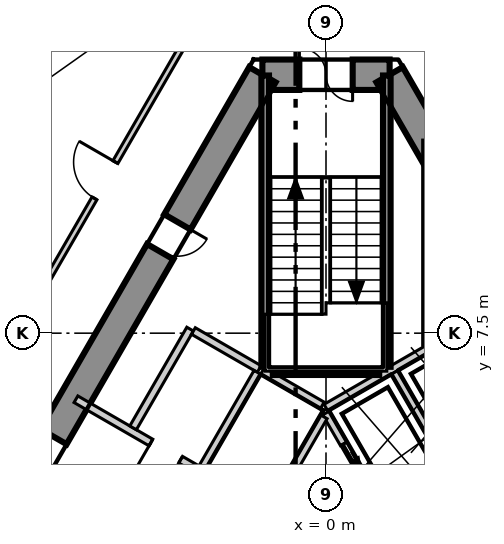
"""IFC4 building model, lengths in metres.
Left out: names, types, materials, properties, quantities, classifications, styles, units other than length and angle.
Written with IfcOpenShell. Run it as: python <this file> out.ifc"""

import sys

from ifc_helpers import new_model, si_unit, direction, frame, frame_2d, origin, place, context, subcontext, project, spatial, polyline, rectangle, outline, extrude, element, fill, save


model = new_model("IFC4")
c1 = context("Model", 3, precision=1e-05, world=origin(), true_north=direction((0.0, 1.0)))
c2 = subcontext(c1, "Body", "Model", "MODEL_VIEW")
j1 = project(units=[si_unit("LENGTHUNIT", "METRE"), si_unit("PLANEANGLEUNIT", "RADIAN")], contexts=[c1])
p1 = place(None, origin())
s1 = spatial("IfcSite", under=j1, at=p1, CompositionType="ELEMENT")
p2 = place(p1, origin())
s2 = spatial("IfcBuilding", under=s1, at=p2, CompositionType="ELEMENT")
p3 = place(p2, frame((0.0, 0.0, 152.3)))
s3 = spatial("IfcBuildingStorey", under=s2, at=p3, CompositionType="ELEMENT", Elevation=152.3)
p4 = place(p3, frame((1.674, 14.3, -0.3), z_axis=(0.0, 0.0, 1.0), x_axis=(-1.0, 0.0, 0.0)))
e1 = element("IfcWall", 1, at=p4, inside=s3, PredefinedType="SHEAR", context=c2, shape_type="SweptSolid", body=[
    extrude(outline(polyline([(-0.231, -0.4), (1.674, -0.4), (3.579, -0.4), (3.117, 0.4), (1.674, 0.4), (0.231, 0.4), (-0.231, -0.4)])), origin(), (0.0, 0.0, 1.0), 4.0),
])
p5 = place(p4, frame((0.974, 0.0, 0.3)))
e2 = element("IfcOpeningElement", 2, at=p5, cuts=e1, PredefinedType="OPENING", context=c2, shape_type="SweptSolid", body=[
    extrude(rectangle(XDim=1.4, YDim=2.1, at=frame_2d((0.7, 1.05))), frame((0.0, 0.41, 0.0), z_axis=(0.0, -1.0, 0.0), x_axis=(1.0, 0.0, 0.0)), (0.0, 0.0, 1.0), 0.82),
])
p6 = place(p3, frame((-1.674, 14.3, -0.3), z_axis=(0.0, 0.0, 1.0), x_axis=(-0.499995765644, -0.866027848477, 0.0)))
e3 = element("IfcWall", 3, at=p6, inside=s3, PredefinedType="SHEAR", context=c2, shape_type="SweptSolid", body=[
    extrude(outline(polyline([(-0.231, -0.4), (1.732, -0.4), (3.695, -0.4), (5.658, -0.4), (7.621, -0.4), (9.584, -0.4), (11.547, -0.4), (13.51, -0.4), (15.473, -0.4), (17.436, -0.4), (19.399, -0.4), (21.362, -0.4), (23.325, -0.4), (22.863, 0.4), (20.977, 0.4), (19.091, 0.4), (17.205, 0.4), (15.319, 0.4), (13.433, 0.4), (11.547, 0.4), (9.661, 0.4), (7.775, 0.4), (5.889, 0.4), (4.003, 0.4), (2.117, 0.4), (0.231, 0.4), (-0.231, -0.4)])), origin(), (0.0, 0.0, 1.0), 4.0),
])
p7 = place(p6, frame((10.997, 0.0, 0.3)))
e4 = element("IfcOpeningElement", 4, at=p7, cuts=e3, PredefinedType="OPENING", context=c2, shape_type="SweptSolid", body=[
    extrude(rectangle(XDim=1.1, YDim=2.1, at=frame_2d((0.55, 1.05))), frame((0.0, 0.41, 0.0), z_axis=(0.0, -1.0, 0.0), x_axis=(1.0, 0.0, 0.0)), (0.0, 0.0, 1.0), 0.82),
])
p8 = place(p6, frame((4.474, 0.0, 0.3)))
e5 = element("IfcOpeningElement", 5, at=p8, cuts=e3, PredefinedType="OPENING", context=c2, shape_type="SweptSolid", body=[
    extrude(rectangle(XDim=0.9, YDim=2.1, at=frame_2d((0.45, 1.05))), frame((0.0, 0.41, 0.0), z_axis=(0.0, -1.0, 0.0), x_axis=(1.0, 0.0, 0.0)), (0.0, 0.0, 1.0), 0.82),
])
p9 = place(p3, frame((13.221, -5.7, -0.3), z_axis=(0.0, 0.0, 1.0), x_axis=(-0.499995765644, 0.866027848477, 0.0)))
e6 = element("IfcWall", 6, at=p9, inside=s3, PredefinedType="SHEAR", context=c2, shape_type="SweptSolid", body=[
    extrude(outline(polyline([(-0.231, -0.4), (1.732, -0.4), (3.695, -0.4), (5.658, -0.4), (7.621, -0.4), (9.584, -0.4), (11.547, -0.4), (13.51, -0.4), (15.473, -0.4), (17.436, -0.4), (19.399, -0.4), (21.362, -0.4), (23.325, -0.4), (22.863, 0.4), (20.977, 0.4), (19.091, 0.4), (17.205, 0.4), (15.319, 0.4), (13.433, 0.4), (11.547, 0.4), (9.661, 0.4), (7.775, 0.4), (5.889, 0.4), (4.003, 0.4), (2.117, 0.4), (0.231, 0.4), (-0.231, -0.4)])), origin(), (0.0, 0.0, 1.0), 4.0),
])
p10 = place(p9, frame((10.647, 0.0, 0.3)))
e7 = element("IfcOpeningElement", 7, at=p10, cuts=e6, PredefinedType="OPENING", context=c2, shape_type="SweptSolid", body=[
    extrude(rectangle(XDim=1.8, YDim=2.1, at=frame_2d((0.9, 1.05))), frame((0.0, 0.41, 0.0), z_axis=(0.0, -1.0, 0.0), x_axis=(1.0, 0.0, 0.0)), (0.0, 0.0, 1.0), 0.82),
])
p11 = place(p3, frame((-3.018, 33.666, 0.0), z_axis=(0.0, 0.0, 1.0), x_axis=(-0.499984613623, -0.866034286931, 0.0)))
e8 = element("IfcWall", 8, at=p11, inside=s3, PredefinedType="ELEMENTEDWALL", context=c2, shape_type="SweptSolid", body=[
    extrude(rectangle(XDim=55.274, YDim=0.2, at=frame_2d((27.637, 0.0))), origin(), (0.0, 0.0, 1.0), 3.7),
])
p12 = place(p11, frame((2.145, 0.0, 0.9)))
e9 = element("IfcOpeningElement", 9, at=p12, cuts=e8, PredefinedType="OPENING", context=c2, shape_type="SweptSolid", body=[
    extrude(rectangle(XDim=4.9, YDim=2.5, at=frame_2d((2.45, 1.25))), frame((0.0, 0.11, 0.0), z_axis=(0.0, -1.0, 0.0), x_axis=(1.0, 0.0, 0.0)), (0.0, 0.0, 1.0), 0.22),
])
p13 = place(p11, frame((8.731, 0.0, 0.9)))
e10 = element("IfcOpeningElement", 10, at=p13, cuts=e8, PredefinedType="OPENING", context=c2, shape_type="SweptSolid", body=[
    extrude(rectangle(XDim=4.9, YDim=2.5, at=frame_2d((2.45, 1.25))), frame((0.0, 0.11, 0.0), z_axis=(0.0, -1.0, 0.0), x_axis=(1.0, 0.0, 0.0)), (0.0, 0.0, 1.0), 0.22),
])
p14 = place(p11, frame((15.318, 0.0, 0.9)))
e11 = element("IfcOpeningElement", 11, at=p14, cuts=e8, PredefinedType="OPENING", context=c2, shape_type="SweptSolid", body=[
    extrude(rectangle(XDim=4.9, YDim=2.5, at=frame_2d((2.45, 1.25))), frame((0.0, 0.11, 0.0), z_axis=(0.0, -1.0, 0.0), x_axis=(1.0, 0.0, 0.0)), (0.0, 0.0, 1.0), 0.22),
])
p15 = place(p11, frame((21.904, 0.0, 0.9)))
e12 = element("IfcOpeningElement", 12, at=p15, cuts=e8, PredefinedType="OPENING", context=c2, shape_type="SweptSolid", body=[
    extrude(rectangle(XDim=4.9, YDim=2.5, at=frame_2d((2.45, 1.25))), frame((0.0, 0.11, 0.0), z_axis=(0.0, -1.0, 0.0), x_axis=(1.0, 0.0, 0.0)), (0.0, 0.0, 1.0), 0.22),
])
p16 = place(p11, frame((28.49, 0.0, 0.9)))
e13 = element("IfcOpeningElement", 13, at=p16, cuts=e8, PredefinedType="OPENING", context=c2, shape_type="SweptSolid", body=[
    extrude(rectangle(XDim=4.9, YDim=2.5, at=frame_2d((2.45, 1.25))), frame((0.0, 0.11, 0.0), z_axis=(0.0, -1.0, 0.0), x_axis=(1.0, 0.0, 0.0)), (0.0, 0.0, 1.0), 0.22),
])
p17 = place(p11, frame((35.076, 0.0, 0.9)))
e14 = element("IfcOpeningElement", 14, at=p17, cuts=e8, PredefinedType="OPENING", context=c2, shape_type="SweptSolid", body=[
    extrude(rectangle(XDim=4.9, YDim=2.5, at=frame_2d((2.45, 1.25))), frame((0.0, 0.11, 0.0), z_axis=(0.0, -1.0, 0.0), x_axis=(1.0, 0.0, 0.0)), (0.0, 0.0, 1.0), 0.22),
])
p18 = place(p11, frame((41.662, 0.0, 0.9)))
e15 = element("IfcOpeningElement", 15, at=p18, cuts=e8, PredefinedType="OPENING", context=c2, shape_type="SweptSolid", body=[
    extrude(rectangle(XDim=4.9, YDim=2.5, at=frame_2d((2.45, 1.25))), frame((0.0, 0.11, 0.0), z_axis=(0.0, -1.0, 0.0), x_axis=(1.0, 0.0, 0.0)), (0.0, 0.0, 1.0), 0.22),
])
p19 = place(p11, frame((48.248, 0.0, 0.9)))
e16 = element("IfcOpeningElement", 16, at=p19, cuts=e8, PredefinedType="OPENING", context=c2, shape_type="SweptSolid", body=[
    extrude(rectangle(XDim=4.9, YDim=2.5, at=frame_2d((2.45, 1.25))), frame((0.0, 0.11, 0.0), z_axis=(0.0, -1.0, 0.0), x_axis=(1.0, 0.0, 0.0)), (0.0, 0.0, 1.0), 0.22),
])
p20 = place(p3, frame((-8.902, 6.181, 0.0), z_axis=(0.0, 0.0, 1.0), x_axis=(0.499992688384, 0.866029625107, 0.0)))
e17 = element("IfcWall", 17, at=p20, inside=s3, PredefinedType="PARTITIONING", context=c2, shape_type="SweptSolid", body=[
    extrude(rectangle(XDim=17.804, YDim=0.15, at=frame_2d((8.902, 0.0))), origin(), (0.0, 0.0, 1.0), 3.7),
])
p21 = place(p20, frame((14.554, 0.0, 0.0)))
e18 = element("IfcOpeningElement", 18, at=p21, cuts=e17, PredefinedType="OPENING", context=c2, shape_type="SweptSolid", body=[
    extrude(rectangle(XDim=1.0, YDim=2.1, at=frame_2d((0.5, 1.05))), frame((0.0, 0.085, 0.0), z_axis=(0.0, -1.0, 0.0), x_axis=(1.0, 0.0, 0.0)), (0.0, 0.0, 1.0), 0.17),
])
p22 = place(p20, frame((5.62, 0.0, 0.0)))
e19 = element("IfcOpeningElement", 19, at=p22, cuts=e17, PredefinedType="OPENING", context=c2, shape_type="SweptSolid", body=[
    extrude(rectangle(XDim=1.1, YDim=2.1, at=frame_2d((0.55, 1.05))), frame((0.0, 0.085, 0.0), z_axis=(0.0, -1.0, 0.0), x_axis=(1.0, 0.0, 0.0)), (0.0, 0.0, 1.0), 0.17),
])
p23 = place(p3, frame((0.076, 21.468, 0.0), z_axis=(0.0, 0.0, 1.0), x_axis=(0.500006592492, -0.866021597574, 0.0)))
e20 = element("IfcWall", 20, at=p23, inside=s3, PredefinedType="PARTITIONING", context=c2, shape_type="SweptSolid", body=[
    extrude(rectangle(XDim=17.652, YDim=0.15, at=frame_2d((8.826, 0.0))), origin(), (0.0, 0.0, 1.0), 3.7),
])
p24 = place(p23, frame((8.204, 0.0, 0.0)))
e21 = element("IfcOpeningElement", 21, at=p24, cuts=e20, PredefinedType="OPENING", context=c2, shape_type="SweptSolid", body=[
    extrude(rectangle(XDim=1.1, YDim=2.1, at=frame_2d((0.55, 1.05))), frame((0.0, 0.085, 0.0), z_axis=(0.0, -1.0, 0.0), x_axis=(1.0, 0.0, 0.0)), (0.0, 0.0, 1.0), 0.17),
])
p25 = place(p3, frame((-11.983, 8.045, 0.0), z_axis=(0.0, 0.0, 1.0), x_axis=(0.49998396455, 0.866034661658, 0.0)))
e22 = element("IfcWall", 22, at=p25, inside=s3, PredefinedType="PARTITIONING", context=c2, shape_type="SweptSolid", body=[
    extrude(rectangle(XDim=12.122, YDim=0.15, at=frame_2d((6.061, 0.0))), origin(), (0.0, 0.0, 1.0), 3.7),
])
p26 = place(p25, frame((5.547, 0.0, 0.0)))
e23 = element("IfcOpeningElement", 23, at=p26, cuts=e22, PredefinedType="OPENING", context=c2, shape_type="SweptSolid", body=[
    extrude(rectangle(XDim=1.0, YDim=2.1, at=frame_2d((0.5, 1.05))), frame((0.0, 0.085, 0.0), z_axis=(0.0, -1.0, 0.0), x_axis=(1.0, 0.0, 0.0)), (0.0, 0.0, 1.0), 0.17),
])
p27 = place(p3, frame((-0.002, 5.541, 0.0), z_axis=(0.0, 0.0, 1.0), x_axis=(0.86600155993, 0.500041296494, 0.0)))
e24 = element("IfcWall", 24, at=p27, inside=s3, PredefinedType="SOLIDWALL", context=c2, shape_type="SweptSolid", body=[
    extrude(rectangle(XDim=4.132, YDim=0.2, at=frame_2d((2.066, 0.0))), origin(), (0.0, 0.0, 1.0), 3.7),
])
p28 = place(p3, frame((0.0, 5.4, 0.0), z_axis=(0.0, 0.0, 1.0), x_axis=(0.500103862429, -0.865965430478, 0.0)))
e25 = element("IfcWall", 25, at=p28, inside=s3, PredefinedType="SOLIDWALL", context=c2, shape_type="SweptSolid", body=[
    extrude(rectangle(XDim=2.973, YDim=0.2, at=frame_2d((1.487, 0.0))), origin(), (0.0, 0.0, 1.0), 3.7),
])
p29 = place(p28, frame((0.937, 0.0, 0.0)))
e26 = element("IfcOpeningElement", 26, at=p29, cuts=e25, PredefinedType="OPENING", context=c2, shape_type="SweptSolid", body=[
    extrude(rectangle(XDim=1.1, YDim=2.1, at=frame_2d((0.55, 1.05))), frame((0.0, 0.11, 0.0), z_axis=(0.0, -1.0, 0.0), x_axis=(1.0, 0.0, 0.0)), (0.0, 0.0, 1.0), 0.22),
])
p30 = place(p3, frame((1.577, 2.874, 0.0), z_axis=(0.0, 0.0, 1.0), x_axis=(0.866073694534, 0.499916348638, 0.0)))
e27 = element("IfcWall", 27, at=p30, inside=s3, PredefinedType="SOLIDWALL", context=c2, shape_type="SweptSolid", body=[
    extrude(rectangle(XDim=5.777, YDim=0.2, at=frame_2d((2.888, 0.0))), origin(), (0.0, 0.0, 1.0), 3.7),
])
p31 = place(p30, frame((2.497, 0.0, 0.0)))
e28 = element("IfcOpeningElement", 28, at=p31, cuts=e27, PredefinedType="OPENING", context=c2, shape_type="SweptSolid", body=[
    extrude(rectangle(XDim=1.1, YDim=2.1, at=frame_2d((0.55, 1.05))), frame((0.0, 0.11, 0.0), z_axis=(0.0, -1.0, 0.0), x_axis=(1.0, 0.0, 0.0)), (0.0, 0.0, 1.0), 0.22),
])
p32 = place(p3, frame((1.807, 6.47, 0.0), z_axis=(0.0, 0.0, 1.0), x_axis=(0.50012328804, -0.865954211699, 0.0)))
e29 = element("IfcWall", 29, at=p32, inside=s3, PredefinedType="SOLIDWALL", context=c2, shape_type="SweptSolid", body=[
    extrude(rectangle(XDim=2.9, YDim=0.2, at=frame_2d((1.45, 0.0))), origin(), (0.0, 0.0, 1.0), 3.7),
])
p33 = place(p3, frame((-6.58, 5.762, 0.0), z_axis=(0.0, 0.0, 1.0), x_axis=(0.866029704776, -0.49999255039, 0.0)))
e30 = element("IfcWall", 30, at=p33, inside=s3, PredefinedType="SOLIDWALL", context=c2, shape_type="SweptSolid", body=[
    extrude(rectangle(XDim=3.782, YDim=0.2, at=frame_2d((1.891, 0.0))), origin(), (0.0, 0.0, 1.0), 3.7),
])
p34 = place(p33, frame((2.279, 0.0, 0.0)))
e31 = element("IfcOpeningElement", 31, at=p34, cuts=e30, PredefinedType="OPENING", context=c2, shape_type="SweptSolid", body=[
    extrude(rectangle(XDim=0.9, YDim=2.1, at=frame_2d((0.45, 1.05))), frame((0.0, 0.11, 0.0), z_axis=(0.0, -1.0, 0.0), x_axis=(1.0, 0.0, 0.0)), (0.0, 0.0, 1.0), 0.22),
])
p35 = place(p3, frame((-5.076, 5.009, 0.0), z_axis=(0.0, 0.0, 1.0), x_axis=(0.50002537861, 0.866010750942, 0.0)))
e32 = element("IfcWall", 32, at=p35, inside=s3, PredefinedType="SOLIDWALL", context=c2, shape_type="SweptSolid", body=[
    extrude(rectangle(XDim=3.0, YDim=0.2, at=frame_2d((1.5, 0.0))), origin(), (0.0, 0.0, 1.0), 3.7),
])
p36 = place(p3, frame((-3.489, 7.557, 0.0), z_axis=(0.0, 0.0, 1.0), x_axis=(0.866010750942, -0.50002537861, 0.0)))
e33 = element("IfcWall", 33, at=p36, inside=s3, PredefinedType="SOLIDWALL", context=c2, shape_type="SweptSolid", body=[
    extrude(rectangle(XDim=2.0, YDim=0.2, at=frame_2d((1.0, 0.0))), origin(), (0.0, 0.0, 1.0), 3.7),
])
p37 = place(p3, frame((-3.257, 3.959, 0.0), z_axis=(0.0, 0.0, 1.0), x_axis=(0.50012328804, 0.865954211699, 0.0)))
e34 = element("IfcWall", 34, at=p37, inside=s3, PredefinedType="SOLIDWALL", context=c2, shape_type="SweptSolid", body=[
    extrude(rectangle(XDim=2.9, YDim=0.2, at=frame_2d((1.45, 0.0))), origin(), (0.0, 0.0, 1.0), 3.7),
])
p38 = place(p3, frame((-1.67, 6.507, 0.0), z_axis=(0.0, 0.0, 1.0), x_axis=(0.865941441609, -0.500145398563, 0.0)))
e35 = element("IfcWall", 35, at=p38, inside=s3, PredefinedType="SOLIDWALL", context=c2, shape_type="SweptSolid", body=[
    extrude(rectangle(XDim=1.815, YDim=0.2, at=frame_2d((0.908, 0.0))), origin(), (0.0, 0.0, 1.0), 3.7),
])
p39 = place(p3, frame((-1.438, 2.909, 0.0), z_axis=(0.0, 0.0, 1.0), x_axis=(0.499829630636, 0.866123744241, 0.0)))
e36 = element("IfcWall", 36, at=p39, inside=s3, PredefinedType="SOLIDWALL", context=c2, shape_type="SweptSolid", body=[
    extrude(rectangle(XDim=2.761, YDim=0.2, at=frame_2d((1.38, 0.0))), origin(), (0.0, 0.0, 1.0), 3.7),
])
p40 = place(p3, frame((2.644, 7.185, 0.0), z_axis=(0.0, 0.0, 1.0), x_axis=(0.0, 1.0, 0.0)))
e37 = element("IfcWall", 37, at=p40, inside=s3, PredefinedType="SOLIDWALL", context=c2, shape_type="SweptSolid", body=[
    extrude(rectangle(XDim=5.395, YDim=0.2, at=frame_2d((2.698, 0.0))), origin(), (0.0, 0.0, 1.0), 3.7),
])
p41 = place(p3, frame((1.6, 6.615, 0.0), z_axis=(0.0, 0.0, 1.0), x_axis=(0.0, 1.0, 0.0)))
e38 = element("IfcWall", 38, at=p41, inside=s3, PredefinedType="SOLIDWALL", context=c2, shape_type="SweptSolid", body=[
    extrude(rectangle(XDim=7.665, YDim=0.2, at=frame_2d((3.833, 0.0))), origin(), (0.0, 0.0, 1.0), 3.7),
])
p42 = place(p3, frame((-1.4, 6.5, 0.0), z_axis=(0.0, 0.0, 1.0), x_axis=(1.0, 0.0, 0.0)))
e39 = element("IfcWall", 39, at=p42, inside=s3, PredefinedType="SOLIDWALL", context=c2, shape_type="SweptSolid", body=[
    extrude(rectangle(XDim=2.8, YDim=0.2, at=frame_2d((1.4, 0.0))), origin(), (0.0, 0.0, 1.0), 3.7),
])
p43 = place(p3, frame((-1.6, 6.615, 0.0), z_axis=(0.0, 0.0, 1.0), x_axis=(0.0, 1.0, 0.0)))
e40 = element("IfcWall", 40, at=p43, inside=s3, PredefinedType="SOLIDWALL", context=c2, shape_type="SweptSolid", body=[
    extrude(rectangle(XDim=7.665, YDim=0.2, at=frame_2d((3.833, 0.0))), origin(), (0.0, 0.0, 1.0), 3.7),
])
p44 = place(p29, origin())
e41 = element("IfcDoor", 41, at=p44, inside=s3, OperationType="SLIDING_TO_LEFT", PredefinedType="DOOR", context=c2, shape_type="SweptSolid", body=[
    extrude(rectangle(XDim=1.1, YDim=2.1, at=frame_2d((0.55, 1.05))), frame((0.0, 0.025, 0.0), z_axis=(0.0, -1.0, 0.0), x_axis=(1.0, 0.0, 0.0)), (0.0, 0.0, 1.0), 0.05),
])
fill(e26, e41)
p45 = place(p34, origin())
e42 = element("IfcDoor", 42, at=p45, inside=s3, OperationType="SINGLE_SWING_LEFT", PredefinedType="DOOR", context=c2, shape_type="SweptSolid", body=[
    extrude(rectangle(XDim=0.9, YDim=2.1, at=frame_2d((0.45, 1.05))), frame((0.0, 0.025, 0.0), z_axis=(0.0, -1.0, 0.0), x_axis=(1.0, 0.0, 0.0)), (0.0, 0.0, 1.0), 0.05),
])
fill(e31, e42)
p46 = place(p22, origin())
e43 = element("IfcDoor", 43, at=p46, inside=s3, OperationType="SINGLE_SWING_LEFT", PredefinedType="DOOR", context=c2, shape_type="SweptSolid", body=[
    extrude(rectangle(XDim=1.1, YDim=2.1, at=frame_2d((0.55, 1.05))), frame((0.0, 0.025, 0.0), z_axis=(0.0, -1.0, 0.0), x_axis=(1.0, 0.0, 0.0)), (0.0, 0.0, 1.0), 0.05),
])
fill(e19, e43)
p47 = place(p5, origin())
e44 = element("IfcDoor", 44, at=p47, inside=s3, OperationType="DOUBLE_DOOR_SINGLE_SWING", PredefinedType="DOOR", context=c2, shape_type="SweptSolid", body=[
    extrude(rectangle(XDim=1.4, YDim=2.1, at=frame_2d((0.7, 1.05))), frame((0.0, 0.025, 0.0), z_axis=(0.0, -1.0, 0.0), x_axis=(1.0, 0.0, 0.0)), (0.0, 0.0, 1.0), 0.05),
])
fill(e2, e44)
p48 = place(p7, origin())
e45 = element("IfcDoor", 45, at=p48, inside=s3, OperationType="SINGLE_SWING_LEFT", PredefinedType="DOOR", context=c2, shape_type="SweptSolid", body=[
    extrude(rectangle(XDim=1.1, YDim=2.1, at=frame_2d((0.55, 1.05))), frame((0.0, 0.025, 0.0), z_axis=(0.0, -1.0, 0.0), x_axis=(1.0, 0.0, 0.0)), (0.0, 0.0, 1.0), 0.05),
])
fill(e4, e45)
p49 = place(p8, origin())
e46 = element("IfcDoor", 46, at=p49, inside=s3, OperationType="SINGLE_SWING_RIGHT", PredefinedType="DOOR", context=c2, shape_type="SweptSolid", body=[
    extrude(rectangle(XDim=0.9, YDim=2.1, at=frame_2d((0.45, 1.05))), frame((0.0, 0.025, 0.0), z_axis=(0.0, -1.0, 0.0), x_axis=(1.0, 0.0, 0.0)), (0.0, 0.0, 1.0), 0.05),
])
fill(e5, e46)
save(model, sys.argv[1])
